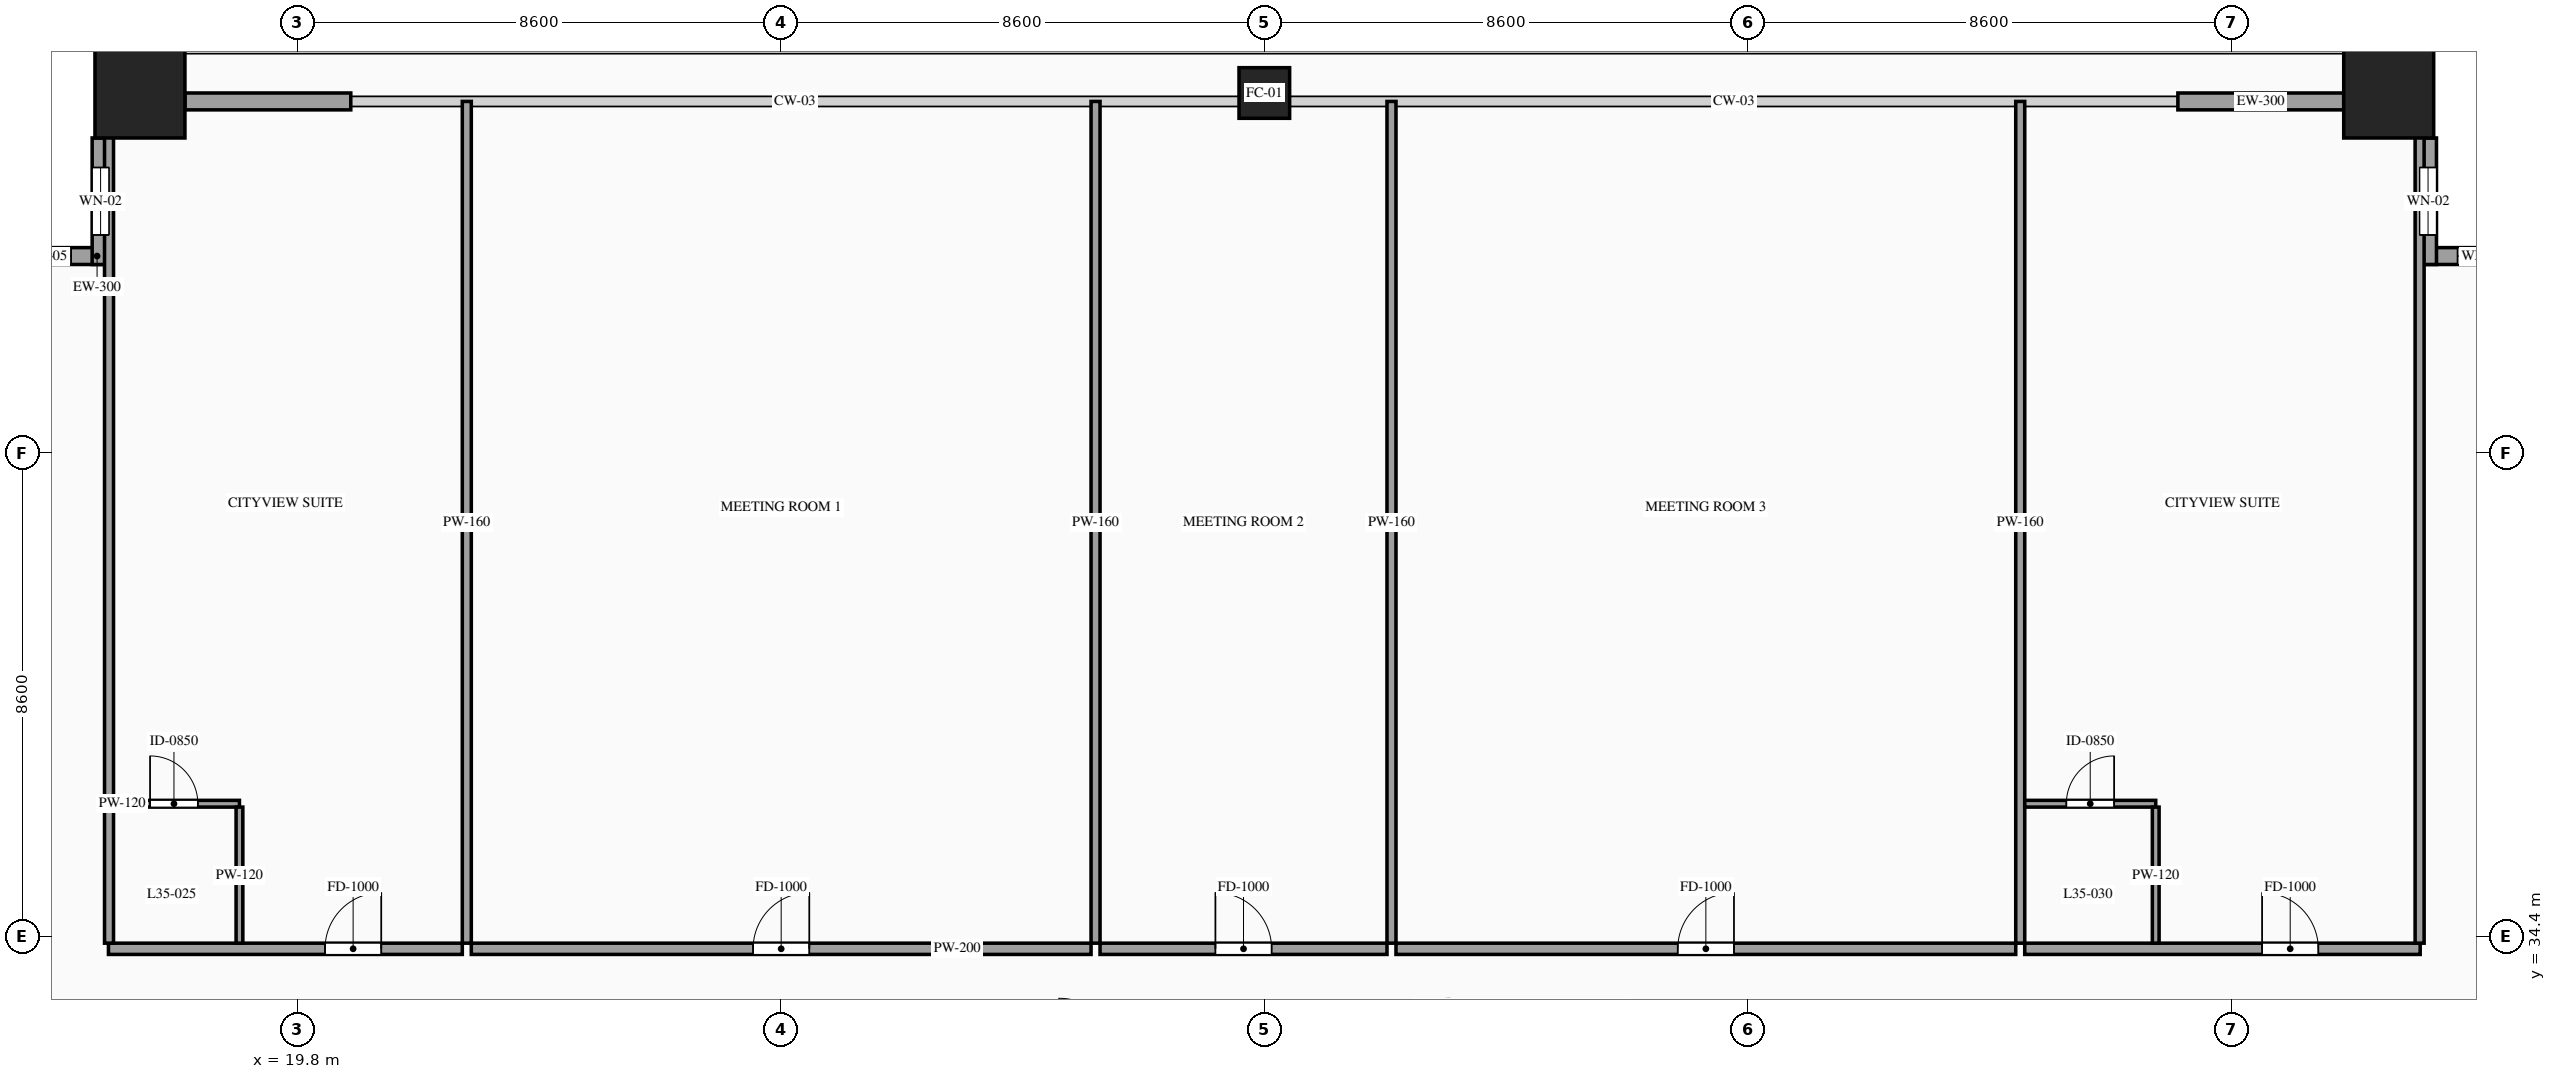
"""IFC4 building model, lengths in metres.
Left out: names, types, materials, properties, quantities, classifications, styles, units other than length and angle.
Written with IfcOpenShell. Run it as: python <this file> out.ifc"""

import sys

from ifc_helpers import new_model, si_unit, direction, frame, frame_2d, origin, origin_2d, place, context, subcontext, project, spatial, rectangle, hollow_rectangle, extrude, source, transform, mapped, element, fill, save


model = new_model("IFC4")
c1 = context("Model", 3, precision=1e-05, world=origin(), true_north=direction((0.0, 1.0)))
c2 = subcontext(c1, "Body", "Model", "MODEL_VIEW")
j1 = project(units=[si_unit("LENGTHUNIT", "METRE"), si_unit("PLANEANGLEUNIT", "RADIAN")], contexts=[c1])
p1 = place(None, origin())
s1 = spatial("IfcSite", under=j1, at=p1, CompositionType="ELEMENT")
p2 = place(p1, origin())
s2 = spatial("IfcBuilding", under=s1, at=p2, CompositionType="ELEMENT")
p3 = place(p2, frame((0.0, 0.0, 134.4)))
s3 = spatial("IfcBuildingStorey", under=s2, at=p3, CompositionType="ELEMENT", Elevation=134.4)
m1 = source(origin(), c2, "Body", "SweptSolid", [
    extrude(hollow_rectangle(XDim=1.6, YDim=1.6, WallThickness=0.07, at=origin_2d()), origin(), (0.0, 0.0, 1.0), 3.6),
])
p4 = place(p3, frame((17.0, 49.4, 0.0), z_axis=(0.0, 0.0, 1.0), x_axis=(1.0, 0.0, 0.0)))
e1 = element("IfcColumn", 1, at=p4, inside=s3, PredefinedType="COLUMN", context=c2, shape_type="MappedRepresentation", body=[
    mapped(m1, transform((0.0, 0.0, 0.0), scale=1.0)),
])
m2 = source(origin(), c2, "Body", "SweptSolid", [
    extrude(hollow_rectangle(XDim=0.9, YDim=0.9, WallThickness=0.042, at=origin_2d()), origin(), (0.0, 0.0, 1.0), 3.6),
])
p5 = place(p3, frame((37.0, 49.4, 0.0), z_axis=(0.0, 0.0, 1.0), x_axis=(1.0, 0.0, 0.0)))
e2 = element("IfcColumn", 2, at=p5, inside=s3, PredefinedType="COLUMN", context=c2, shape_type="MappedRepresentation", body=[
    mapped(m2, transform((0.0, 0.0, 0.0), scale=1.0)),
])
p6 = place(p3, frame((57.0, 49.4, 0.0), z_axis=(0.0, 0.0, 1.0), x_axis=(1.0, 0.0, 0.0)))
e3 = element("IfcColumn", 3, at=p6, inside=s3, PredefinedType="COLUMN", context=c2, shape_type="MappedRepresentation", body=[
    mapped(m1, transform((0.0, 0.0, 0.0), scale=1.0)),
])
p7 = place(p3, frame((16.45, 46.5, 0.0), z_axis=(0.0, 0.0, 1.0), x_axis=(-1.0, 0.0, 0.0)))
e4 = element("IfcWall", 4, at=p7, inside=s3, PredefinedType="SOLIDWALL", context=c2, shape_type="SweptSolid", body=[
    extrude(rectangle(XDim=2.25, YDim=0.3, at=frame_2d((1.125, 0.0))), origin(), (0.0, 0.0, 1.0), 3.38),
])
p8 = place(p7, frame((0.675, 0.0, 0.85)))
e5 = element("IfcOpeningElement", 5, at=p8, cuts=e4, PredefinedType="OPENING", context=c2, shape_type="SweptSolid", body=[
    extrude(rectangle(XDim=0.9, YDim=1.5, at=frame_2d((0.45, 0.75))), frame((0.0, 0.165, 0.0), z_axis=(0.0, -1.0, 0.0), x_axis=(1.0, 0.0, 0.0)), (0.0, 0.0, 1.0), 0.33),
])
p9 = place(p3, frame((16.3, 48.6, 0.0), z_axis=(0.0, 0.0, 1.0), x_axis=(0.0, -1.0, 0.0)))
e6 = element("IfcWall", 6, at=p9, inside=s3, PredefinedType="SOLIDWALL", context=c2, shape_type="SweptSolid", body=[
    extrude(rectangle(XDim=2.25, YDim=0.3, at=frame_2d((1.125, 0.0))), origin(), (0.0, 0.0, 1.0), 3.38),
])
p10 = place(p9, frame((0.525, 0.0, 0.85)))
e7 = element("IfcOpeningElement", 7, at=p10, cuts=e6, PredefinedType="OPENING", context=c2, shape_type="SweptSolid", body=[
    extrude(rectangle(XDim=1.2, YDim=2.1, at=frame_2d((0.6, 1.05))), frame((0.0, 0.165, 0.0), z_axis=(0.0, -1.0, 0.0), x_axis=(1.0, 0.0, 0.0)), (0.0, 0.0, 1.0), 0.33),
])
p11 = place(p3, frame((59.8, 46.5, 0.0), z_axis=(0.0, 0.0, 1.0), x_axis=(-1.0, 0.0, 0.0)))
e8 = element("IfcWall", 8, at=p11, inside=s3, PredefinedType="SOLIDWALL", context=c2, shape_type="SweptSolid", body=[
    extrude(rectangle(XDim=2.25, YDim=0.3, at=frame_2d((1.125, 0.0))), origin(), (0.0, 0.0, 1.0), 3.38),
])
p12 = place(p11, frame((0.675, 0.0, 0.85)))
e9 = element("IfcOpeningElement", 9, at=p12, cuts=e8, PredefinedType="OPENING", context=c2, shape_type="SweptSolid", body=[
    extrude(rectangle(XDim=0.9, YDim=1.5, at=frame_2d((0.45, 0.75))), frame((0.0, 0.165, 0.0), z_axis=(0.0, -1.0, 0.0), x_axis=(1.0, 0.0, 0.0)), (0.0, 0.0, 1.0), 0.33),
])
p13 = place(p3, frame((57.7, 46.35, 0.0), z_axis=(0.0, 0.0, 1.0), x_axis=(0.0, 1.0, 0.0)))
e10 = element("IfcWall", 10, at=p13, inside=s3, PredefinedType="SOLIDWALL", context=c2, shape_type="SweptSolid", body=[
    extrude(rectangle(XDim=2.25, YDim=0.3, at=frame_2d((1.125, 0.0))), origin(), (0.0, 0.0, 1.0), 3.38),
])
p14 = place(p13, frame((0.525, 0.0, 0.85)))
e11 = element("IfcOpeningElement", 11, at=p14, cuts=e10, PredefinedType="OPENING", context=c2, shape_type="SweptSolid", body=[
    extrude(rectangle(XDim=1.2, YDim=2.1, at=frame_2d((0.6, 1.05))), frame((0.0, 0.165, 0.0), z_axis=(0.0, -1.0, 0.0), x_axis=(1.0, 0.0, 0.0)), (0.0, 0.0, 1.0), 0.33),
])
m3 = source(origin(), c2, "Body", "SweptSolid", [
    extrude(rectangle(XDim=2.95, YDim=0.3, at=frame_2d((1.475, 0.0))), origin(), (0.0, 0.0, 1.0), 2.775),
])
for number, where, z_axis, x_axis in (
    (12, (17.8, 49.25, 0.0), (0.0, 0.0, 1.0), (1.0, 0.0, 0.0)),
    (13, (53.25, 49.25, 0.0), (0.0, 0.0, 1.0), (1.0, 0.0, 0.0)),
):
    element("IfcWall", number, at=place(p3, frame(where, z_axis=z_axis, x_axis=x_axis)), inside=s3, PredefinedType="SOLIDWALL", context=c2, shape_type="MappedRepresentation", body=[
        mapped(m3, transform((0.0, 0.0, 0.0), scale=1.0)),
    ])
p15 = place(p3, frame((16.44, 34.18, 0.0), z_axis=(0.0, 0.0, 1.0), x_axis=(1.0, 0.0, 0.0)))
e14 = element("IfcWall", 14, at=p15, inside=s3, PredefinedType="PARTITIONING", context=c2, shape_type="SweptSolid", body=[
    extrude(rectangle(XDim=6.294, YDim=0.2, at=frame_2d((3.147, 0.0))), origin(), (0.0, 0.0, 1.0), 3.38),
])
p16 = place(p15, frame((3.852, 0.0, 0.0)))
e15 = element("IfcOpeningElement", 15, at=p16, cuts=e14, PredefinedType="OPENING", context=c2, shape_type="SweptSolid", body=[
    extrude(rectangle(XDim=1.0, YDim=2.2, at=frame_2d((0.5, 1.1))), frame((0.0, 0.115, 0.0), z_axis=(0.0, -1.0, 0.0), x_axis=(1.0, 0.0, 0.0)), (0.0, 0.0, 1.0), 0.23),
])
m4 = source(origin(), c2, "Body", "SweptSolid", [
    extrude(rectangle(XDim=14.97, YDim=0.16, at=frame_2d((7.485, 0.0))), origin(), (0.0, 0.0, 1.0), 3.38),
])
p17 = place(p3, frame((22.814, 34.28, 0.0), z_axis=(0.0, 0.0, 1.0), x_axis=(0.0, 1.0, 0.0)))
e16 = element("IfcWall", 16, at=p17, inside=s3, PredefinedType="PARTITIONING", context=c2, shape_type="MappedRepresentation", body=[
    mapped(m4, transform((0.0, 0.0, 0.0), scale=1.0)),
])
p18 = place(p3, frame((16.44, 36.76, 0.0), z_axis=(0.0, 0.0, 1.0), x_axis=(1.0, 0.0, 0.0)))
e17 = element("IfcWall", 17, at=p18, inside=s3, PredefinedType="PARTITIONING", context=c2, shape_type="SweptSolid", body=[
    extrude(rectangle(XDim=2.33, YDim=0.12, at=frame_2d((1.165, 0.0))), origin(), (0.0, 0.0, 1.0), 3.38),
])
p19 = place(p18, frame((0.74, 0.0, 0.0)))
e18 = element("IfcOpeningElement", 18, at=p19, cuts=e17, PredefinedType="OPENING", context=c2, shape_type="SweptSolid", body=[
    extrude(rectangle(XDim=0.85, YDim=2.1, at=frame_2d((0.425, 1.05))), frame((0.0, 0.075, 0.0), z_axis=(0.0, -1.0, 0.0), x_axis=(1.0, 0.0, 0.0)), (0.0, 0.0, 1.0), 0.15),
])
m5 = source(origin(), c2, "Body", "SweptSolid", [
    extrude(rectangle(XDim=2.42, YDim=0.12, at=frame_2d((1.21, 0.0))), origin(), (0.0, 0.0, 1.0), 3.38),
])
p20 = place(p3, frame((18.77, 34.28, 0.0), z_axis=(0.0, 0.0, 1.0), x_axis=(0.0, 1.0, 0.0)))
e19 = element("IfcWall", 19, at=p20, inside=s3, PredefinedType="PARTITIONING", context=c2, shape_type="MappedRepresentation", body=[
    mapped(m5, transform((0.0, 0.0, 0.0), scale=1.0)),
])
p21 = place(p3, frame((22.894, 34.18, 0.0), z_axis=(0.0, 0.0, 1.0), x_axis=(1.0, 0.0, 0.0)))
e20 = element("IfcWall", 20, at=p21, inside=s3, PredefinedType="PARTITIONING", context=c2, shape_type="SweptSolid", body=[
    extrude(rectangle(XDim=11.024, YDim=0.2, at=frame_2d((5.512, 0.0))), origin(), (0.0, 0.0, 1.0), 3.38),
])
p22 = place(p21, frame((5.012, 0.0, 0.0)))
e21 = element("IfcOpeningElement", 21, at=p22, cuts=e20, PredefinedType="OPENING", context=c2, shape_type="SweptSolid", body=[
    extrude(rectangle(XDim=1.0, YDim=2.2, at=frame_2d((0.5, 1.1))), frame((0.0, 0.115, 0.0), z_axis=(0.0, -1.0, 0.0), x_axis=(1.0, 0.0, 0.0)), (0.0, 0.0, 1.0), 0.23),
])
p23 = place(p3, frame((33.998, 34.28, 0.0), z_axis=(0.0, 0.0, 1.0), x_axis=(0.0, 1.0, 0.0)))
e22 = element("IfcWall", 22, at=p23, inside=s3, PredefinedType="PARTITIONING", context=c2, shape_type="MappedRepresentation", body=[
    mapped(m4, transform((0.0, 0.0, 0.0), scale=1.0)),
])
p24 = place(p3, frame((34.078, 34.18, 0.0), z_axis=(0.0, 0.0, 1.0), x_axis=(1.0, 0.0, 0.0)))
e23 = element("IfcWall", 23, at=p24, inside=s3, PredefinedType="PARTITIONING", context=c2, shape_type="SweptSolid", body=[
    extrude(rectangle(XDim=5.104, YDim=0.2, at=frame_2d((2.552, 0.0))), origin(), (0.0, 0.0, 1.0), 3.38),
])
p25 = place(p24, frame((2.052, 0.0, 0.0)))
e24 = element("IfcOpeningElement", 24, at=p25, cuts=e23, PredefinedType="OPENING", context=c2, shape_type="SweptSolid", body=[
    extrude(rectangle(XDim=1.0, YDim=2.2, at=frame_2d((0.5, 1.1))), frame((0.0, 0.115, 0.0), z_axis=(0.0, -1.0, 0.0), x_axis=(1.0, 0.0, 0.0)), (0.0, 0.0, 1.0), 0.23),
])
p26 = place(p3, frame((39.262, 34.28, 0.0), z_axis=(0.0, 0.0, 1.0), x_axis=(0.0, 1.0, 0.0)))
e25 = element("IfcWall", 25, at=p26, inside=s3, PredefinedType="PARTITIONING", context=c2, shape_type="MappedRepresentation", body=[
    mapped(m4, transform((0.0, 0.0, 0.0), scale=1.0)),
])
p27 = place(p3, frame((39.342, 34.18, 0.0), z_axis=(0.0, 0.0, 1.0), x_axis=(1.0, 0.0, 0.0)))
e26 = element("IfcWall", 26, at=p27, inside=s3, PredefinedType="PARTITIONING", context=c2, shape_type="SweptSolid", body=[
    extrude(rectangle(XDim=11.024, YDim=0.2, at=frame_2d((5.512, 0.0))), origin(), (0.0, 0.0, 1.0), 3.38),
])
p28 = place(p27, frame((5.012, 0.0, 0.0)))
e27 = element("IfcOpeningElement", 27, at=p28, cuts=e26, PredefinedType="OPENING", context=c2, shape_type="SweptSolid", body=[
    extrude(rectangle(XDim=1.0, YDim=2.2, at=frame_2d((0.5, 1.1))), frame((0.0, 0.115, 0.0), z_axis=(0.0, -1.0, 0.0), x_axis=(1.0, 0.0, 0.0)), (0.0, 0.0, 1.0), 0.23),
])
p29 = place(p3, frame((50.446, 34.28, 0.0), z_axis=(0.0, 0.0, 1.0), x_axis=(0.0, 1.0, 0.0)))
e28 = element("IfcWall", 28, at=p29, inside=s3, PredefinedType="PARTITIONING", context=c2, shape_type="MappedRepresentation", body=[
    mapped(m4, transform((0.0, 0.0, 0.0), scale=1.0)),
])
p30 = place(p3, frame((50.526, 34.18, 0.0), z_axis=(0.0, 0.0, 1.0), x_axis=(1.0, 0.0, 0.0)))
e29 = element("IfcWall", 29, at=p30, inside=s3, PredefinedType="PARTITIONING", context=c2, shape_type="SweptSolid", body=[
    extrude(rectangle(XDim=7.034, YDim=0.2, at=frame_2d((3.517, 0.0))), origin(), (0.0, 0.0, 1.0), 3.38),
])
p31 = place(p30, frame((4.222, 0.0, 0.0)))
e30 = element("IfcOpeningElement", 30, at=p31, cuts=e29, PredefinedType="OPENING", context=c2, shape_type="SweptSolid", body=[
    extrude(rectangle(XDim=1.0, YDim=2.2, at=frame_2d((0.5, 1.1))), frame((0.0, 0.115, 0.0), z_axis=(0.0, -1.0, 0.0), x_axis=(1.0, 0.0, 0.0)), (0.0, 0.0, 1.0), 0.23),
])
m6 = source(origin(), c2, "Body", "SweptSolid", [
    extrude(rectangle(XDim=14.82, YDim=0.16, at=frame_2d((7.41, 0.0))), origin(), (0.0, 0.0, 1.0), 3.38),
])
for number, where, z_axis, x_axis in (
    (31, (16.45, 34.28, 0.0), (0.0, 0.0, 1.0), (0.0, 1.0, 0.0)),
    (32, (57.55, 34.28, 0.0), (0.0, 0.0, 1.0), (0.0, 1.0, 0.0)),
):
    element("IfcWall", number, at=place(p3, frame(where, z_axis=z_axis, x_axis=x_axis)), inside=s3, PredefinedType="PARTITIONING", context=c2, shape_type="MappedRepresentation", body=[
        mapped(m6, transform((0.0, 0.0, 0.0), scale=1.0)),
    ])
p32 = place(p3, frame((50.526, 36.76, 0.0), z_axis=(0.0, 0.0, 1.0), x_axis=(1.0, 0.0, 0.0)))
e33 = element("IfcWall", 33, at=p32, inside=s3, PredefinedType="PARTITIONING", context=c2, shape_type="SweptSolid", body=[
    extrude(rectangle(XDim=2.33, YDim=0.12, at=frame_2d((1.165, 0.0))), origin(), (0.0, 0.0, 1.0), 3.38),
])
p33 = place(p32, frame((0.74, 0.0, 0.0)))
e34 = element("IfcOpeningElement", 34, at=p33, cuts=e33, PredefinedType="OPENING", context=c2, shape_type="SweptSolid", body=[
    extrude(rectangle(XDim=0.85, YDim=2.1, at=frame_2d((0.425, 1.05))), frame((0.0, 0.075, 0.0), z_axis=(0.0, -1.0, 0.0), x_axis=(1.0, 0.0, 0.0)), (0.0, 0.0, 1.0), 0.15),
])
p34 = place(p3, frame((52.856, 34.28, 0.0), z_axis=(0.0, 0.0, 1.0), x_axis=(0.0, 1.0, 0.0)))
e35 = element("IfcWall", 35, at=p34, inside=s3, PredefinedType="PARTITIONING", context=c2, shape_type="MappedRepresentation", body=[
    mapped(m5, transform((0.0, 0.0, 0.0), scale=1.0)),
])
m7 = source(origin(), c2, "Body", "SweptSolid", [
    extrude(rectangle(XDim=0.9, YDim=1.5, at=frame_2d((0.45, 0.75))), frame((0.0, 0.03, 0.0), z_axis=(0.0, -1.0, 0.0), x_axis=(1.0, 0.0, 0.0)), (0.0, 0.0, 1.0), 0.06),
])
p35 = place(p8, origin())
e36 = element("IfcWindow", 36, at=p35, inside=s3, PartitioningType="SINGLE_PANEL", PredefinedType="WINDOW", context=c2, shape_type="MappedRepresentation", body=[
    mapped(m7, transform((0.0, 0.0, 0.0), scale=1.0)),
])
fill(e5, e36)
m8 = source(origin(), c2, "Body", "SweptSolid", [
    extrude(rectangle(XDim=1.2, YDim=2.1, at=frame_2d((0.6, 1.05))), frame((0.0, 0.03, 0.0), z_axis=(0.0, -1.0, 0.0), x_axis=(1.0, 0.0, 0.0)), (0.0, 0.0, 1.0), 0.06),
])
p36 = place(p10, origin())
e37 = element("IfcWindow", 37, at=p36, inside=s3, PartitioningType="SINGLE_PANEL", PredefinedType="WINDOW", context=c2, shape_type="MappedRepresentation", body=[
    mapped(m8, transform((0.0, 0.0, 0.0), scale=1.0)),
])
fill(e7, e37)
p37 = place(p12, origin())
e38 = element("IfcWindow", 38, at=p37, inside=s3, PartitioningType="SINGLE_PANEL", PredefinedType="WINDOW", context=c2, shape_type="MappedRepresentation", body=[
    mapped(m7, transform((0.0, 0.0, 0.0), scale=1.0)),
])
fill(e9, e38)
p38 = place(p14, origin())
e39 = element("IfcWindow", 39, at=p38, inside=s3, PartitioningType="SINGLE_PANEL", PredefinedType="WINDOW", context=c2, shape_type="MappedRepresentation", body=[
    mapped(m8, transform((0.0, 0.0, 0.0), scale=1.0)),
])
fill(e11, e39)
m9 = source(origin(), c2, "Body", "SweptSolid", [
    extrude(rectangle(XDim=1.0, YDim=2.2, at=frame_2d((0.5, 1.1))), frame((0.0, 0.025, 0.0), z_axis=(0.0, -1.0, 0.0), x_axis=(1.0, 0.0, 0.0)), (0.0, 0.0, 1.0), 0.05),
])
p39 = place(p16, origin())
e40 = element("IfcDoor", 40, at=p39, inside=s3, OperationType="SINGLE_SWING_RIGHT", PredefinedType="DOOR", context=c2, shape_type="MappedRepresentation", body=[
    mapped(m9, transform((0.0, 0.0, 0.0), scale=1.0)),
])
fill(e15, e40)
m10 = source(origin(), c2, "Body", "SweptSolid", [
    extrude(rectangle(XDim=0.85, YDim=2.1, at=frame_2d((0.425, 1.05))), frame((0.0, 0.025, 0.0), z_axis=(0.0, -1.0, 0.0), x_axis=(1.0, 0.0, 0.0)), (0.0, 0.0, 1.0), 0.05),
])
p40 = place(p19, origin())
e41 = element("IfcDoor", 41, at=p40, inside=s3, OperationType="SINGLE_SWING_LEFT", PredefinedType="DOOR", context=c2, shape_type="MappedRepresentation", body=[
    mapped(m10, transform((0.0, 0.0, 0.0), scale=1.0)),
])
fill(e18, e41)
p41 = place(p22, origin())
e42 = element("IfcDoor", 42, at=p41, inside=s3, OperationType="SINGLE_SWING_RIGHT", PredefinedType="DOOR", context=c2, shape_type="MappedRepresentation", body=[
    mapped(m9, transform((0.0, 0.0, 0.0), scale=1.0)),
])
fill(e21, e42)
p42 = place(p25, origin())
e43 = element("IfcDoor", 43, at=p42, inside=s3, OperationType="SINGLE_SWING_LEFT", PredefinedType="DOOR", context=c2, shape_type="MappedRepresentation", body=[
    mapped(m9, transform((0.0, 0.0, 0.0), scale=1.0)),
])
fill(e24, e43)
p43 = place(p28, origin())
e44 = element("IfcDoor", 44, at=p43, inside=s3, OperationType="SINGLE_SWING_RIGHT", PredefinedType="DOOR", context=c2, shape_type="MappedRepresentation", body=[
    mapped(m9, transform((0.0, 0.0, 0.0), scale=1.0)),
])
fill(e27, e44)
p44 = place(p31, origin())
e45 = element("IfcDoor", 45, at=p44, inside=s3, OperationType="SINGLE_SWING_LEFT", PredefinedType="DOOR", context=c2, shape_type="MappedRepresentation", body=[
    mapped(m9, transform((0.0, 0.0, 0.0), scale=1.0)),
])
fill(e30, e45)
p45 = place(p33, origin())
e46 = element("IfcDoor", 46, at=p45, inside=s3, OperationType="SINGLE_SWING_RIGHT", PredefinedType="DOOR", context=c2, shape_type="MappedRepresentation", body=[
    mapped(m10, transform((0.0, 0.0, 0.0), scale=1.0)),
])
fill(e34, e46)
save(model, sys.argv[1])
